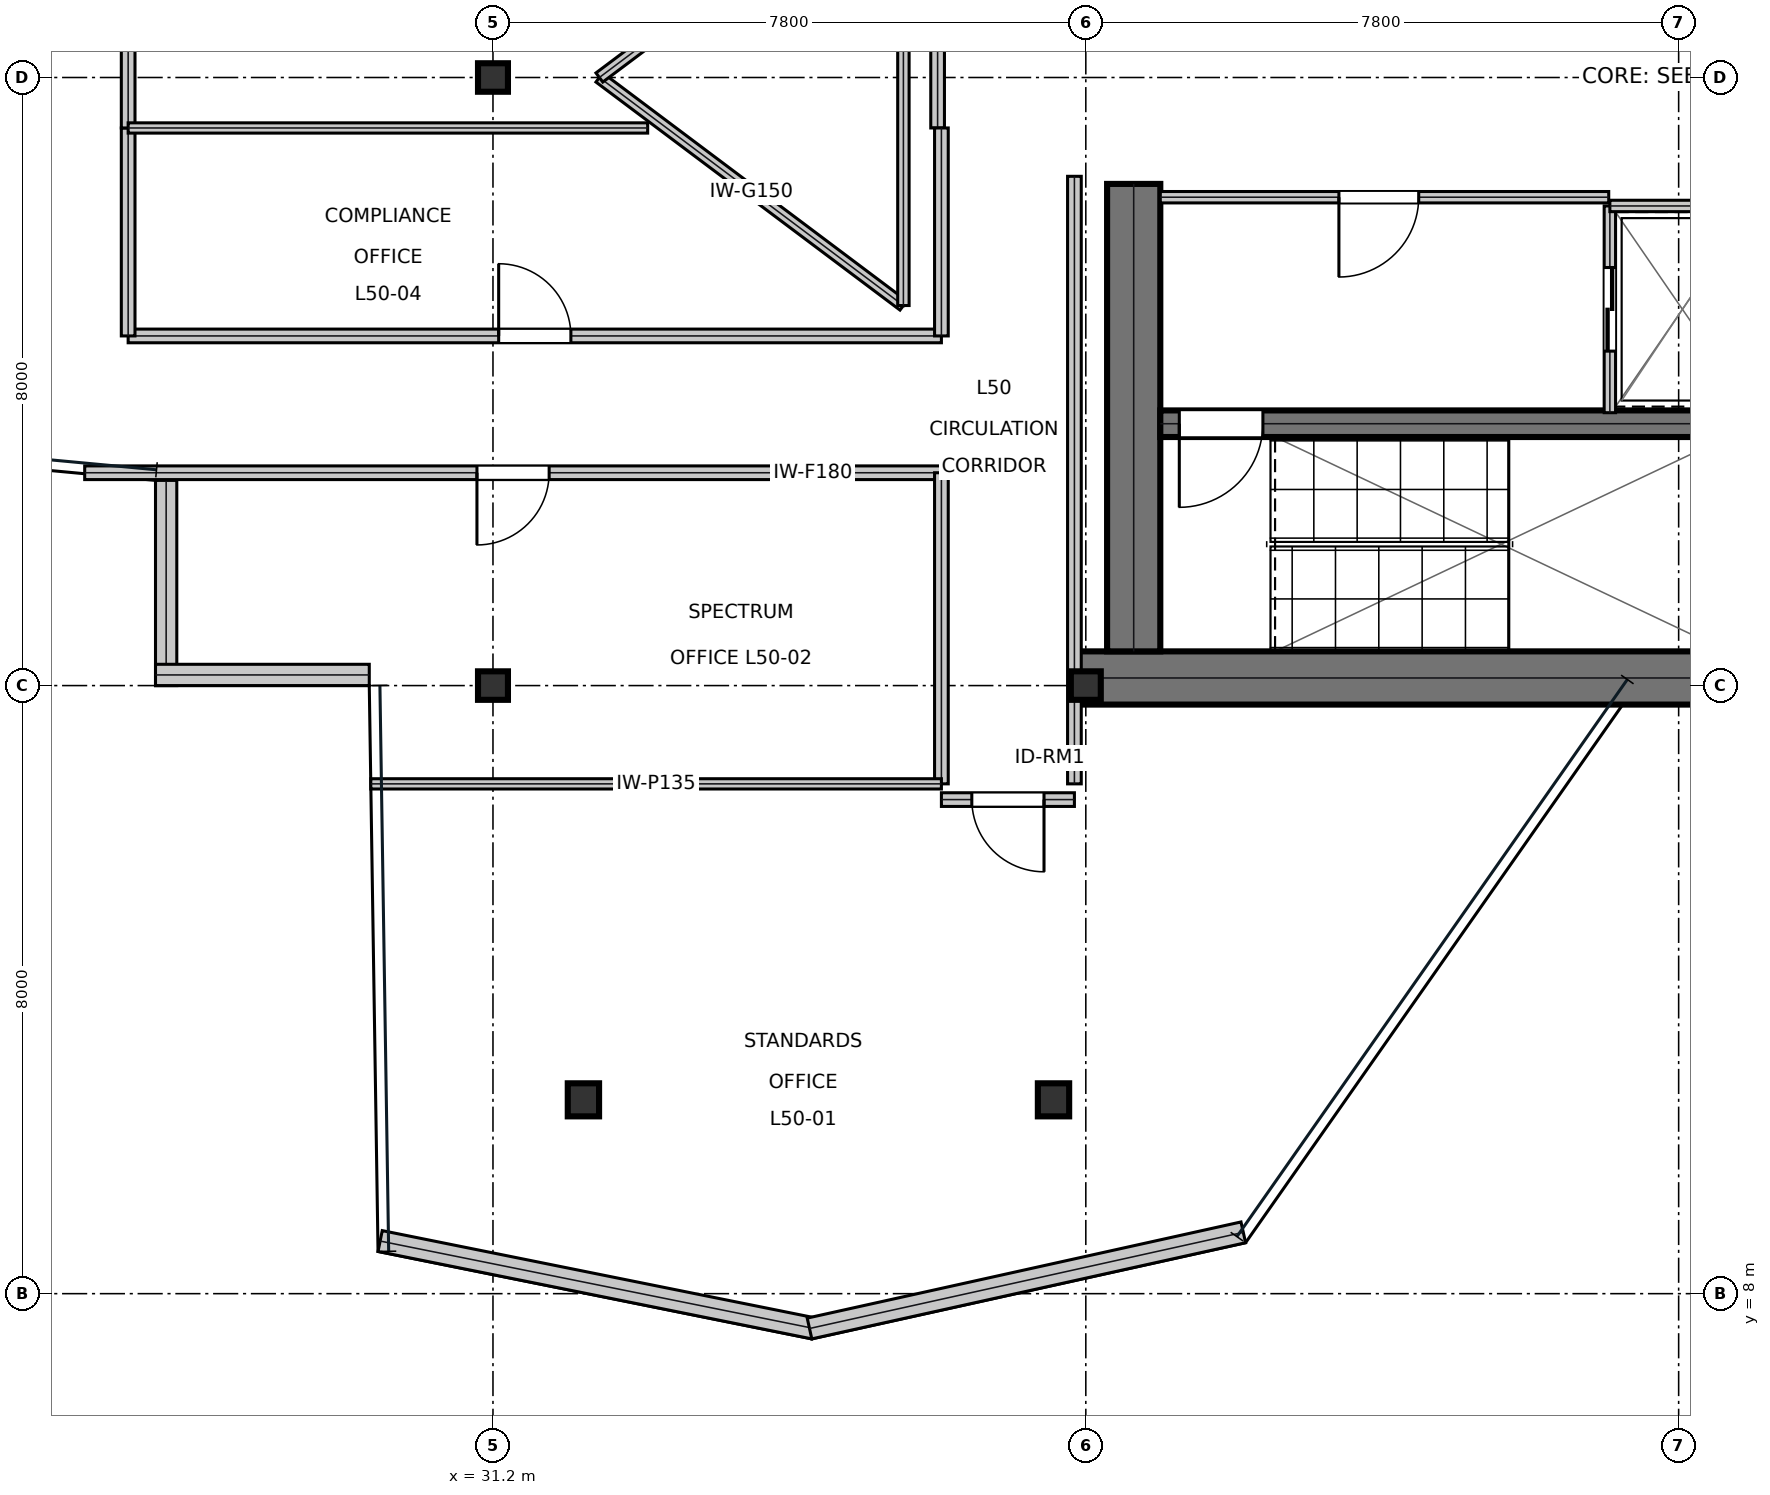
"""IFC4 building model, lengths in metres.
Left out: names, types, materials, properties, quantities, classifications, styles, units other than length and angle.
Written with IfcOpenShell. Run it as: python <this file> out.ifc"""

import sys

from ifc_helpers import new_model, si_unit, direction, frame, frame_2d, origin, origin_2d, place, context, subcontext, project, spatial, rectangle, i_section, extrude, element, fill, save


model = new_model("IFC4")
c1 = context("Model", 3, precision=1e-05, world=origin(), true_north=direction((0.0, 1.0)))
c2 = subcontext(c1, "Body", "Model", "MODEL_VIEW")
j1 = project(units=[si_unit("LENGTHUNIT", "METRE"), si_unit("PLANEANGLEUNIT", "RADIAN")], contexts=[c1])
p1 = place(None, origin())
s1 = spatial("IfcSite", under=j1, at=p1, CompositionType="ELEMENT")
p2 = place(p1, origin())
s2 = spatial("IfcBuilding", under=s1, at=p2, CompositionType="ELEMENT")
p3 = place(p2, frame((0.0, 0.0, 216.15)))
s3 = spatial("IfcBuildingStorey", under=s2, at=p3, CompositionType="ELEMENT", Elevation=216.15)
p4 = place(p3, frame((38.8, 16.1, 0.0), z_axis=(0.0, 0.0, 1.0), x_axis=(1.0, 0.0, 0.0)))
e1 = element("IfcWall", 1, at=p4, inside=s3, PredefinedType="SHEAR", context=c2, shape_type="SweptSolid", body=[
    extrude(rectangle(XDim=16.0, YDim=0.7, at=frame_2d((8.0, 0.0))), origin(), (0.0, 0.0, 1.0), 3.79),
])
p5 = place(p3, frame((39.63, 16.45, 0.0), z_axis=(0.0, 0.0, 1.0), x_axis=(0.0, 1.0, 0.0)))
e2 = element("IfcWall", 2, at=p5, inside=s3, PredefinedType="SHEAR", context=c2, shape_type="SweptSolid", body=[
    extrude(rectangle(XDim=6.15, YDim=0.7, at=frame_2d((3.075, 0.0))), origin(), (0.0, 0.0, 1.0), 3.79),
])
p6 = place(p3, frame((39.98, 19.445, 0.0), z_axis=(0.0, 0.0, 1.0), x_axis=(1.0, 0.0, 0.0)))
e3 = element("IfcWall", 3, at=p6, inside=s3, PredefinedType="SHEAR", context=c2, shape_type="SweptSolid", body=[
    extrude(rectangle(XDim=7.71, YDim=0.35, at=frame_2d((3.855, 0.0))), origin(), (0.0, 0.0, 1.0), 3.79),
])
p7 = place(p6, frame((0.25, 0.0, 0.0)))
e4 = element("IfcOpeningElement", 4, at=p7, cuts=e3, PredefinedType="OPENING", context=c2, shape_type="SweptSolid", body=[
    extrude(rectangle(XDim=1.1, YDim=2.15, at=frame_2d((0.55, 1.075))), frame((0.0, 0.185, 0.0), z_axis=(0.0, -1.0, 0.0), x_axis=(1.0, 0.0, 0.0)), (0.0, 0.0, 1.0), 0.37),
])
for number, where, z_axis, x_axis in (
    (5, (31.2, 16.0, 0.0), (0.0, 0.0, 1.0), (1.0, 0.0, 0.0)),
    (6, (31.2, 24.0, 0.0), (0.0, 0.0, 1.0), (1.0, 0.0, 0.0)),
    (7, (39.0, 16.0, 0.0), (0.0, 0.0, 1.0), (1.0, 0.0, 0.0)),
):
    element("IfcColumn", number, at=place(p3, frame(where, z_axis=z_axis, x_axis=x_axis)), inside=s3, PredefinedType="COLUMN", context=c2, shape_type="SweptSolid", body=[
        extrude(i_section(OverallWidth=0.394, OverallDepth=0.375, WebThickness=0.017, FlangeThickness=0.028, at=origin_2d()), origin(), (0.0, 0.0, 1.0), 4.044),
    ])
for number, where, z_axis, x_axis in (
    (8, (32.39, 10.55, 0.016), (0.0, 0.0, 1.0), (1.0, 0.0, 0.0)),
    (9, (38.575, 10.55, 0.016), (0.0, 0.0, 1.0), (1.0, 0.0, 0.0)),
):
    element("IfcColumn", number, at=place(p3, frame(where, z_axis=z_axis, x_axis=x_axis)), inside=s3, PredefinedType="COLUMN", context=c2, shape_type="SweptSolid", body=[
        extrude(i_section(OverallWidth=0.412, OverallDepth=0.435, WebThickness=0.036, FlangeThickness=0.058, at=origin_2d()), origin(), (0.0, 0.0, 1.0), 4.018),
    ])
p8 = place(p3, frame((26.9, 18.7, 0.0), z_axis=(0.0, 0.0, 1.0), x_axis=(0.0, -1.0, 0.0)))
e10 = element("IfcWall", 10, at=p8, inside=s3, PredefinedType="STANDARD", context=c2, shape_type="SweptSolid", body=[
    extrude(rectangle(XDim=2.7, YDim=0.28, at=frame_2d((1.35, 0.0))), origin(), (0.0, 0.0, 1.0), 3.319),
])
p9 = place(p3, frame((26.76, 16.14, 0.0), z_axis=(0.0, 0.0, 1.0), x_axis=(1.0, 0.0, 0.0)))
e11 = element("IfcWall", 11, at=p9, inside=s3, PredefinedType="STANDARD", context=c2, shape_type="SweptSolid", body=[
    extrude(rectangle(XDim=2.812, YDim=0.28, at=frame_2d((1.406, 0.0))), origin(), (0.0, 0.0, 1.0), 3.79),
])
p10 = place(p3, frame((29.715, 8.692, 0.0), z_axis=(0.0, 0.0, 1.0), x_axis=(0.98030065813, -0.197511062146, 0.0)))
e12 = element("IfcWall", 12, at=p10, inside=s3, PredefinedType="STANDARD", context=c2, shape_type="SweptSolid", body=[
    extrude(rectangle(XDim=5.822, YDim=0.28, at=frame_2d((2.911, 0.0))), origin(), (0.0, 0.0, 1.0), 3.79),
])
p11 = place(p3, frame((35.365, 7.542, 0.0), z_axis=(0.0, 0.0, 1.0), x_axis=(0.976309738065, 0.216377668346, 0.0)))
e13 = element("IfcWall", 13, at=p11, inside=s3, PredefinedType="STANDARD", context=c2, shape_type="SweptSolid", body=[
    extrude(rectangle(XDim=5.846, YDim=0.28, at=frame_2d((2.923, 0.0))), origin(), (0.0, 0.0, 1.0), 3.79),
])
p12 = place(p3, frame((39.98, 22.425, 0.0), z_axis=(0.0, 0.0, 1.0), x_axis=(1.0, 0.0, 0.0)))
e14 = element("IfcWall", 14, at=p12, inside=s3, PredefinedType="PARTITIONING", context=c2, shape_type="SweptSolid", body=[
    extrude(rectangle(XDim=5.9, YDim=0.15, at=frame_2d((2.95, 0.0))), origin(), (0.0, 0.0, 1.0), 3.79),
])
p13 = place(p12, frame((2.35, 0.0, 0.0)))
e15 = element("IfcOpeningElement", 15, at=p13, cuts=e14, PredefinedType="OPENING", context=c2, shape_type="SweptSolid", body=[
    extrude(rectangle(XDim=1.05, YDim=2.15, at=frame_2d((0.525, 1.075))), frame((0.0, 0.085, 0.0), z_axis=(0.0, -1.0, 0.0), x_axis=(1.0, 0.0, 0.0)), (0.0, 0.0, 1.0), 0.17),
])
p14 = place(p3, frame((45.895, 19.59, 0.0), z_axis=(0.0, 0.0, 1.0), x_axis=(0.0, 1.0, 0.0)))
e16 = element("IfcWall", 16, at=p14, inside=s3, PredefinedType="PARTITIONING", context=c2, shape_type="SweptSolid", body=[
    extrude(rectangle(XDim=2.72, YDim=0.15, at=frame_2d((1.36, 0.0))), origin(), (0.0, 0.0, 1.0), 3.79),
])
p15 = place(p14, frame((0.81, 0.0, 0.0)))
e17 = element("IfcOpeningElement", 17, at=p15, cuts=e16, PredefinedType="OPENING", context=c2, shape_type="SweptSolid", body=[
    extrude(rectangle(XDim=1.1, YDim=2.15, at=frame_2d((0.55, 1.075))), frame((0.0, 0.085, 0.0), z_axis=(0.0, -1.0, 0.0), x_axis=(1.0, 0.0, 0.0)), (0.0, 0.0, 1.0), 0.17),
])
p16 = place(p3, frame((45.895, 22.31, 0.0), z_axis=(0.0, 0.0, 1.0), x_axis=(1.0, 0.0, 0.0)))
e18 = element("IfcWall", 18, at=p16, inside=s3, PredefinedType="PARTITIONING", context=c2, shape_type="SweptSolid", body=[
    extrude(rectangle(XDim=1.915, YDim=0.15, at=frame_2d((0.958, 0.0))), origin(), (0.0, 0.0, 1.0), 3.79),
])
p17 = place(p3, frame((37.1, 14.5, 0.0), z_axis=(0.0, 0.0, 1.0), x_axis=(1.0, 0.0, 0.0)))
e19 = element("IfcWall", 19, at=p17, inside=s3, PredefinedType="SOLIDWALL", context=c2, shape_type="SweptSolid", body=[
    extrude(rectangle(XDim=1.75, YDim=0.18, at=frame_2d((0.875, 0.0))), origin(), (0.0, 0.0, 1.0), 3.241),
])
p18 = place(p17, frame((0.4, 0.0, 0.0)))
e20 = element("IfcOpeningElement", 20, at=p18, cuts=e19, PredefinedType="OPENING", context=c2, shape_type="SweptSolid", body=[
    extrude(rectangle(XDim=0.95, YDim=2.15, at=frame_2d((0.475, 1.075))), frame((0.0, 0.1, 0.0), z_axis=(0.0, -1.0, 0.0), x_axis=(1.0, 0.0, 0.0)), (0.0, 0.0, 1.0), 0.2),
])
p19 = place(p3, frame((25.828, 18.8, 0.0), z_axis=(0.0, 0.0, 1.0), x_axis=(1.0, 0.0, 0.0)))
e21 = element("IfcWall", 21, at=p19, inside=s3, PredefinedType="SOLIDWALL", context=c2, shape_type="SweptSolid", body=[
    extrude(rectangle(XDim=11.272, YDim=0.18, at=frame_2d((5.636, 0.0))), origin(), (0.0, 0.0, 1.0), 3.241),
])
p20 = place(p19, frame((5.161, 0.0, 0.0)))
e22 = element("IfcOpeningElement", 22, at=p20, cuts=e21, PredefinedType="OPENING", context=c2, shape_type="SweptSolid", body=[
    extrude(rectangle(XDim=0.95, YDim=2.15, at=frame_2d((0.475, 1.075))), frame((0.0, 0.1, 0.0), z_axis=(0.0, -1.0, 0.0), x_axis=(1.0, 0.0, 0.0)), (0.0, 0.0, 1.0), 0.2),
])
p21 = place(p3, frame((26.4, 20.6, 0.0), z_axis=(0.0, 0.0, 1.0), x_axis=(1.0, 0.0, 0.0)))
e23 = element("IfcWall", 23, at=p21, inside=s3, PredefinedType="SOLIDWALL", context=c2, shape_type="SweptSolid", body=[
    extrude(rectangle(XDim=10.7, YDim=0.18, at=frame_2d((5.35, 0.0))), origin(), (0.0, 0.0, 1.0), 3.241),
])
p22 = place(p21, frame((4.875, 0.0, 0.0)))
e24 = element("IfcOpeningElement", 24, at=p22, cuts=e23, PredefinedType="OPENING", context=c2, shape_type="SweptSolid", body=[
    extrude(rectangle(XDim=0.95, YDim=2.15, at=frame_2d((0.475, 1.075))), frame((0.0, 0.1, 0.0), z_axis=(0.0, -1.0, 0.0), x_axis=(1.0, 0.0, 0.0)), (0.0, 0.0, 1.0), 0.2),
])
p23 = place(p3, frame((37.05, 23.336, 0.0), z_axis=(0.0, 0.0, 1.0), x_axis=(0.0, 1.0, 0.0)))
e25 = element("IfcWall", 25, at=p23, inside=s3, PredefinedType="SOLIDWALL", context=c2, shape_type="SweptSolid", body=[
    extrude(rectangle(XDim=10.164, YDim=0.18, at=frame_2d((5.082, 0.0))), origin(), (0.0, 0.0, 1.0), 3.241),
])
p24 = place(p23, frame((4.607, 0.0, 0.0)))
e26 = element("IfcOpeningElement", 26, at=p24, cuts=e25, PredefinedType="OPENING", context=c2, shape_type="SweptSolid", body=[
    extrude(rectangle(XDim=0.95, YDim=2.15, at=frame_2d((0.475, 1.075))), frame((0.0, 0.1, 0.0), z_axis=(0.0, -1.0, 0.0), x_axis=(1.0, 0.0, 0.0)), (0.0, 0.0, 1.0), 0.2),
])
p25 = place(p3, frame((38.85, 14.707, 0.0), z_axis=(0.0, 0.0, 1.0), x_axis=(0.0, 1.0, 0.0)))
e27 = element("IfcWall", 27, at=p25, inside=s3, PredefinedType="SOLIDWALL", context=c2, shape_type="SweptSolid", body=[
    extrude(rectangle(XDim=7.993, YDim=0.18, at=frame_2d((3.997, 0.0))), origin(), (0.0, 0.0, 1.0), 3.241),
])
p26 = place(p3, frame((37.1, 14.707, 0.0), z_axis=(0.0, 0.0, 1.0), x_axis=(0.0, 1.0, 0.0)))
e28 = element("IfcWall", 28, at=p26, inside=s3, PredefinedType="SOLIDWALL", context=c2, shape_type="SweptSolid", body=[
    extrude(rectangle(XDim=4.093, YDim=0.18, at=frame_2d((2.046, 0.0))), origin(), (0.0, 0.0, 1.0), 3.241),
])
p27 = place(p3, frame((26.4, 20.6, 0.0), z_axis=(0.0, 0.0, 1.0), x_axis=(0.0, 1.0, 0.0)))
e29 = element("IfcWall", 29, at=p27, inside=s3, PredefinedType="SOLIDWALL", context=c2, shape_type="SweptSolid", body=[
    extrude(rectangle(XDim=2.736, YDim=0.18, at=frame_2d((1.368, 0.0))), origin(), (0.0, 0.0, 1.0), 3.241),
])
p28 = place(p3, frame((37.1, 20.6, 0.0), z_axis=(0.0, 0.0, 1.0), x_axis=(0.0, 1.0, 0.0)))
e30 = element("IfcWall", 30, at=p28, inside=s3, PredefinedType="SOLIDWALL", context=c2, shape_type="SweptSolid", body=[
    extrude(rectangle(XDim=2.736, YDim=0.18, at=frame_2d((1.368, 0.0))), origin(), (0.0, 0.0, 1.0), 3.79),
])
p29 = place(p3, frame((26.4, 23.336, 0.0), z_axis=(0.0, 0.0, 1.0), x_axis=(0.0, 1.0, 0.0)))
e31 = element("IfcWall", 31, at=p29, inside=s3, PredefinedType="SOLIDWALL", context=c2, shape_type="SweptSolid", body=[
    extrude(rectangle(XDim=5.931, YDim=0.18, at=frame_2d((2.965, 0.0))), origin(), (0.0, 0.0, 1.0), 3.241),
])
p30 = place(p3, frame((29.592, 14.707, 0.0), z_axis=(0.0, 0.0, 1.0), x_axis=(1.0, 0.0, 0.0)))
e32 = element("IfcWall", 32, at=p30, inside=s3, PredefinedType="PARTITIONING", context=c2, shape_type="SweptSolid", body=[
    extrude(rectangle(XDim=7.508, YDim=0.135, at=frame_2d((3.754, 0.0))), origin(), (0.0, 0.0, 1.0), 3.319),
])
p31 = place(p3, frame((26.4, 23.336, 0.0), z_axis=(0.0, 0.0, 1.0), x_axis=(1.0, 0.0, 0.0)))
e33 = element("IfcWall", 33, at=p31, inside=s3, PredefinedType="PARTITIONING", context=c2, shape_type="SweptSolid", body=[
    extrude(rectangle(XDim=6.835, YDim=0.135, at=frame_2d((3.418, 0.0))), origin(), (0.0, 0.0, 1.0), 3.241),
])
p32 = place(p3, frame((32.6, 24.0, 0.0), z_axis=(0.0, 0.0, 1.0), x_axis=(0.8, -0.6, 0.0)))
e34 = element("IfcWall", 34, at=p32, inside=s3, PredefinedType="MOVABLE", context=c2, shape_type="SweptSolid", body=[
    extrude(rectangle(XDim=5.0, YDim=0.15, at=frame_2d((2.5, 0.0))), origin(), (0.0, 0.0, 1.0), 3.79),
])
p33 = place(p3, frame((36.6, 21.0, 0.0), z_axis=(0.0, 0.0, 1.0), x_axis=(0.0, 1.0, 0.0)))
e35 = element("IfcWall", 35, at=p33, inside=s3, PredefinedType="MOVABLE", context=c2, shape_type="SweptSolid", body=[
    extrude(rectangle(XDim=6.0, YDim=0.15, at=frame_2d((3.0, 0.0))), origin(), (0.0, 0.0, 1.0), 3.79),
])
p34 = place(p3, frame((36.6, 27.0, 0.0), z_axis=(0.0, 0.0, 1.0), x_axis=(-0.8, -0.6, 0.0)))
e36 = element("IfcWall", 36, at=p34, inside=s3, PredefinedType="MOVABLE", context=c2, shape_type="SweptSolid", body=[
    extrude(rectangle(XDim=5.0, YDim=0.15, at=frame_2d((2.5, 0.0))), origin(), (0.0, 0.0, 1.0), 3.79),
])
p35 = place(p13, frame((1.05, 0.0, 0.0), z_axis=(0.0, 0.0, 1.0), x_axis=(-1.0, 0.0, 0.0)))
e37 = element("IfcDoor", 37, at=p35, inside=s3, OperationType="SINGLE_SWING_RIGHT", PredefinedType="DOOR", context=c2, shape_type="SweptSolid", body=[
    extrude(rectangle(XDim=1.05, YDim=2.15, at=frame_2d((0.525, 1.075))), frame((0.0, 0.025, 0.0), z_axis=(0.0, -1.0, 0.0), x_axis=(1.0, 0.0, 0.0)), (0.0, 0.0, 1.0), 0.05),
])
fill(e15, e37)
p36 = place(p15, frame((1.1, 0.0, 0.0), z_axis=(0.0, 0.0, 1.0), x_axis=(-1.0, 0.0, 0.0)))
e38 = element("IfcDoor", 38, at=p36, inside=s3, OperationType="DOUBLE_DOOR_SLIDING", PredefinedType="DOOR", context=c2, shape_type="SweptSolid", body=[
    extrude(rectangle(XDim=1.1, YDim=2.15, at=frame_2d((0.55, 1.075))), frame((0.0, 0.025, 0.0), z_axis=(0.0, -1.0, 0.0), x_axis=(1.0, 0.0, 0.0)), (0.0, 0.0, 1.0), 0.05),
])
fill(e17, e38)
p37 = place(p18, frame((0.95, 0.0, 0.0), z_axis=(0.0, 0.0, 1.0), x_axis=(-1.0, 0.0, 0.0)))
e39 = element("IfcDoor", 39, at=p37, inside=s3, OperationType="SINGLE_SWING_LEFT", PredefinedType="DOOR", context=c2, shape_type="SweptSolid", body=[
    extrude(rectangle(XDim=0.95, YDim=2.15, at=frame_2d((0.475, 1.075))), frame((0.0, 0.025, 0.0), z_axis=(0.0, -1.0, 0.0), x_axis=(1.0, 0.0, 0.0)), (0.0, 0.0, 1.0), 0.05),
])
fill(e20, e39)
p38 = place(p20, frame((0.95, 0.0, 0.0), z_axis=(0.0, 0.0, 1.0), x_axis=(-1.0, 0.0, 0.0)))
e40 = element("IfcDoor", 40, at=p38, inside=s3, OperationType="SINGLE_SWING_RIGHT", PredefinedType="DOOR", context=c2, shape_type="SweptSolid", body=[
    extrude(rectangle(XDim=0.95, YDim=2.15, at=frame_2d((0.475, 1.075))), frame((0.0, 0.025, 0.0), z_axis=(0.0, -1.0, 0.0), x_axis=(1.0, 0.0, 0.0)), (0.0, 0.0, 1.0), 0.05),
])
fill(e22, e40)
p39 = place(p22, origin())
e41 = element("IfcDoor", 41, at=p39, inside=s3, OperationType="SINGLE_SWING_LEFT", PredefinedType="DOOR", context=c2, shape_type="SweptSolid", body=[
    extrude(rectangle(XDim=0.95, YDim=2.15, at=frame_2d((0.475, 1.075))), frame((0.0, 0.025, 0.0), z_axis=(0.0, -1.0, 0.0), x_axis=(1.0, 0.0, 0.0)), (0.0, 0.0, 1.0), 0.05),
])
fill(e24, e41)
p40 = place(p7, frame((1.1, 0.0, 0.0), z_axis=(0.0, 0.0, 1.0), x_axis=(-1.0, 0.0, 0.0)))
e42 = element("IfcDoor", 42, at=p40, inside=s3, OperationType="SINGLE_SWING_RIGHT", PredefinedType="DOOR", context=c2, shape_type="SweptSolid", body=[
    extrude(rectangle(XDim=1.1, YDim=2.15, at=frame_2d((0.55, 1.075))), frame((0.0, 0.025, 0.0), z_axis=(0.0, -1.0, 0.0), x_axis=(1.0, 0.0, 0.0)), (0.0, 0.0, 1.0), 0.05),
])
fill(e4, e42)
save(model, sys.argv[1])
